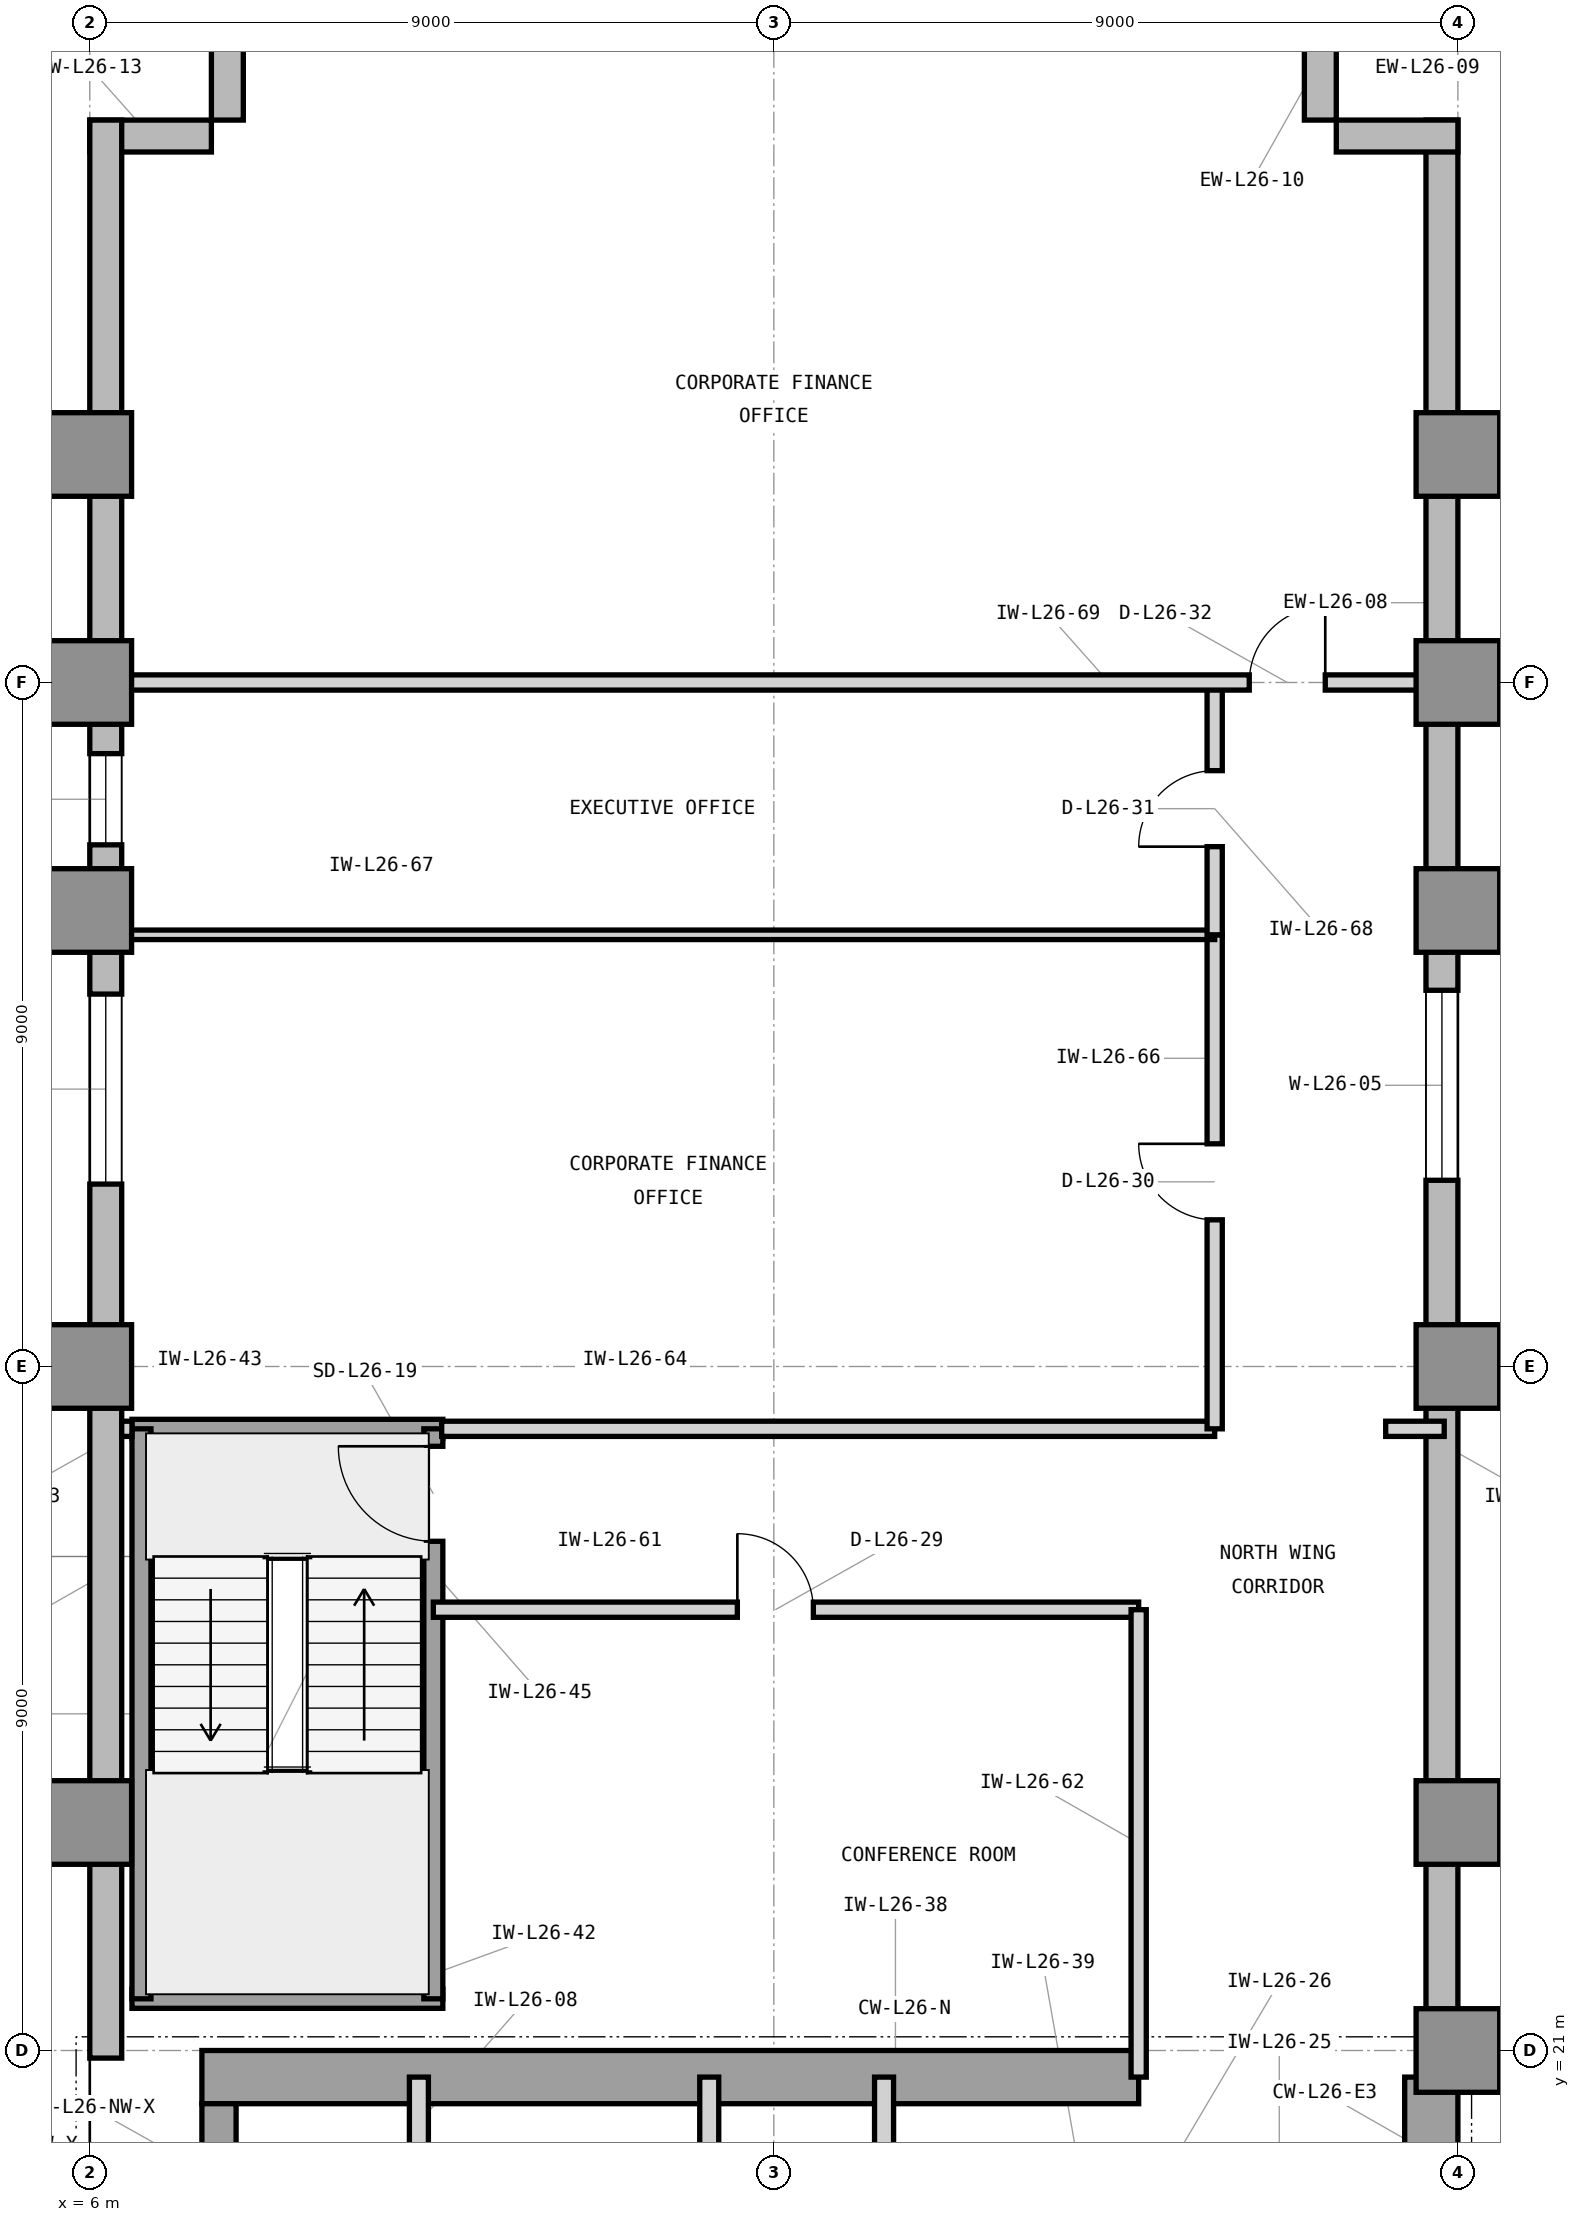
"""IFC4 building model, lengths in metres.
Left out: names, types, materials, properties, quantities, classifications, styles, units other than length and angle.
Written with IfcOpenShell. Run it as: python <this file> out.ifc"""

import sys

from ifc_helpers import new_model, si_unit, direction, frame, frame_2d, origin, origin_2d, place, context, subcontext, project, spatial, rectangle, extrude, element, fill, save


model = new_model("IFC4")
c1 = context("Model", 3, precision=1e-05, world=origin(), true_north=direction((0.0, 1.0)))
c2 = subcontext(c1, "Body", "Model", "MODEL_VIEW")
j1 = project(units=[si_unit("LENGTHUNIT", "METRE"), si_unit("PLANEANGLEUNIT", "RADIAN")], contexts=[c1])
p1 = place(None, origin())
s1 = spatial("IfcSite", under=j1, at=p1, CompositionType="ELEMENT")
p2 = place(p1, origin())
s2 = spatial("IfcBuilding", under=s1, at=p2, CompositionType="ELEMENT")
p3 = place(p2, frame((0.0, 0.0, 112.8)))
s3 = spatial("IfcBuildingStorey", under=s2, at=p3, CompositionType="ELEMENT", Elevation=112.8)
p4 = place(p3, frame((7.475, 20.65, 0.0), z_axis=(0.0, 0.0, 1.0), x_axis=(1.0, 0.0, 0.0)))
e1 = element("IfcWall", 1, at=p4, inside=s3, PredefinedType="SHEAR", context=c2, shape_type="SweptSolid", body=[
    extrude(rectangle(XDim=12.325, YDim=0.7, at=frame_2d((6.163, 0.0))), origin(), (0.0, 0.0, 1.0), 3.9),
])
p5 = place(p3, frame((23.65, 16.6, 0.0), z_axis=(0.0, 0.0, 1.0), x_axis=(0.0, 1.0, 0.0)))
e2 = element("IfcWall", 2, at=p5, inside=s3, PredefinedType="SHEAR", context=c2, shape_type="SweptSolid", body=[
    extrude(rectangle(XDim=4.05, YDim=0.7, at=frame_2d((2.025, 0.0))), origin(), (0.0, 0.0, 1.0), 3.9),
])
p6 = place(p3, frame((7.7, 19.575, 0.0), z_axis=(0.0, 0.0, 1.0), x_axis=(0.0, 1.0, 0.0)))
e3 = element("IfcWall", 3, at=p6, inside=s3, PredefinedType="SHEAR", context=c2, shape_type="SweptSolid", body=[
    extrude(rectangle(XDim=0.725, YDim=0.45, at=frame_2d((0.363, 0.0))), origin(), (0.0, 0.0, 1.0), 3.9),
])
for number, where, z_axis, x_axis in (
    (4, (24.0, 21.0, 0.0), (0.0, 0.0, 1.0), (1.0, 0.0, 0.0)),
    (5, (6.0, 24.0, 0.0), (0.0, 0.0, 1.0), (1.0, 0.0, 0.0)),
    (6, (24.0, 24.0, 0.0), (0.0, 0.0, 1.0), (1.0, 0.0, 0.0)),
    (7, (6.0, 30.0, 0.0), (0.0, 0.0, 1.0), (1.0, 0.0, 0.0)),
    (8, (24.0, 30.0, 0.0), (0.0, 0.0, 1.0), (1.0, 0.0, 0.0)),
    (9, (6.0, 36.0, 0.0), (0.0, 0.0, 1.0), (1.0, 0.0, 0.0)),
    (10, (24.0, 36.0, 0.0), (0.0, 0.0, 1.0), (1.0, 0.0, 0.0)),
    (11, (6.0, 39.0, 0.0), (0.0, 0.0, 1.0), (1.0, 0.0, 0.0)),
    (12, (24.0, 39.0, 0.0), (0.0, 0.0, 1.0), (1.0, 0.0, 0.0)),
    (13, (6.0, 42.0, 0.0), (0.0, 0.0, 1.0), (1.0, 0.0, 0.0)),
    (14, (24.0, 42.0, 0.0), (0.0, 0.0, 1.0), (1.0, 0.0, 0.0)),
):
    element("IfcColumn", number, at=place(p3, frame(where, z_axis=z_axis, x_axis=x_axis)), inside=s3, PredefinedType="COLUMN", context=c2, shape_type="SweptSolid", body=[
        extrude(rectangle(XDim=1.1, YDim=1.1, at=origin_2d()), origin(), (0.0, 0.0, 1.0), 3.9),
    ])
p7 = place(p3, frame((61.4, 20.79, 0.0), z_axis=(0.0, 0.0, 1.0), x_axis=(-1.0, 0.0, 0.0)))
e15 = element("IfcWall", 15, at=p7, inside=s3, PredefinedType="STANDARD", context=c2, shape_type="SweptSolid", body=[
    extrude(rectangle(XDim=37.4, YDim=0.42, at=frame_2d((18.7, 0.0))), origin(), (0.0, 0.0, 1.0), 3.7),
])
p8 = place(p7, frame((35.222, 0.0, 0.85)))
e16 = element("IfcOpeningElement", 16, at=p8, cuts=e15, PredefinedType="OPENING", context=c2, shape_type="SweptSolid", body=[
    extrude(rectangle(XDim=1.2, YDim=2.25, at=frame_2d((0.6, 1.125))), frame((0.0, 0.22, 0.0), z_axis=(0.0, -1.0, 0.0), x_axis=(1.0, 0.0, 0.0)), (0.0, 0.0, 1.0), 0.44),
])
p9 = place(p7, frame((29.386, 0.0, 0.85)))
e17 = element("IfcOpeningElement", 17, at=p9, cuts=e15, PredefinedType="OPENING", context=c2, shape_type="SweptSolid", body=[
    extrude(rectangle(XDim=2.5, YDim=2.25, at=frame_2d((1.25, 1.125))), frame((0.0, 0.22, 0.0), z_axis=(0.0, -1.0, 0.0), x_axis=(1.0, 0.0, 0.0)), (0.0, 0.0, 1.0), 0.44),
])
p10 = place(p7, frame((20.386, 0.0, 0.85)))
e18 = element("IfcOpeningElement", 18, at=p10, cuts=e15, PredefinedType="OPENING", context=c2, shape_type="SweptSolid", body=[
    extrude(rectangle(XDim=2.5, YDim=2.25, at=frame_2d((1.25, 1.125))), frame((0.0, 0.22, 0.0), z_axis=(0.0, -1.0, 0.0), x_axis=(1.0, 0.0, 0.0)), (0.0, 0.0, 1.0), 0.44),
])
p11 = place(p7, frame((8.336, 0.0, 0.85)))
e19 = element("IfcOpeningElement", 19, at=p11, cuts=e15, PredefinedType="OPENING", context=c2, shape_type="SweptSolid", body=[
    extrude(rectangle(XDim=1.2, YDim=2.25, at=frame_2d((0.6, 1.125))), frame((0.0, 0.22, 0.0), z_axis=(0.0, -1.0, 0.0), x_axis=(1.0, 0.0, 0.0)), (0.0, 0.0, 1.0), 0.44),
])
p12 = place(p3, frame((23.79, 21.0, 0.0), z_axis=(0.0, 0.0, 1.0), x_axis=(0.0, 1.0, 0.0)))
e20 = element("IfcWall", 20, at=p12, inside=s3, PredefinedType="STANDARD", context=c2, shape_type="SweptSolid", body=[
    extrude(rectangle(XDim=25.4, YDim=0.42, at=frame_2d((12.7, 0.0))), origin(), (0.0, 0.0, 1.0), 3.7),
])
p13 = place(p12, frame((11.45, 0.0, 0.85)))
e21 = element("IfcOpeningElement", 21, at=p13, cuts=e20, PredefinedType="OPENING", context=c2, shape_type="SweptSolid", body=[
    extrude(rectangle(XDim=2.5, YDim=2.25, at=frame_2d((1.25, 1.125))), frame((0.0, 0.22, 0.0), z_axis=(0.0, -1.0, 0.0), x_axis=(1.0, 0.0, 0.0)), (0.0, 0.0, 1.0), 0.44),
])
for number, where, z_axis, x_axis in (
    (22, (24.0, 46.19, 0.0), (0.0, 0.0, 1.0), (-1.0, 0.0, 0.0)),
    (23, (22.19, 46.4, 0.0), (0.0, 0.0, 1.0), (0.0, 1.0, 0.0)),
    (24, (7.81, 48.0, 0.0), (0.0, 0.0, 1.0), (0.0, -1.0, 0.0)),
    (25, (7.6, 46.19, 0.0), (0.0, 0.0, 1.0), (-1.0, 0.0, 0.0)),
):
    element("IfcWall", number, at=place(p3, frame(where, z_axis=z_axis, x_axis=x_axis)), inside=s3, PredefinedType="STANDARD", context=c2, shape_type="SweptSolid", body=[
        extrude(rectangle(XDim=1.6, YDim=0.42, at=frame_2d((0.8, 0.0))), origin(), (0.0, 0.0, 1.0), 3.7),
    ])
p14 = place(p3, frame((6.21, 46.4, 0.0), z_axis=(0.0, 0.0, 1.0), x_axis=(0.0, -1.0, 0.0)))
e26 = element("IfcWall", 26, at=p14, inside=s3, PredefinedType="STANDARD", context=c2, shape_type="SweptSolid", body=[
    extrude(rectangle(XDim=25.5, YDim=0.42, at=frame_2d((12.75, 0.0))), origin(), (0.0, 0.0, 1.0), 3.7),
])
p15 = place(p14, frame((11.5, 0.0, 0.85)))
e27 = element("IfcOpeningElement", 27, at=p15, cuts=e26, PredefinedType="OPENING", context=c2, shape_type="SweptSolid", body=[
    extrude(rectangle(XDim=2.5, YDim=2.25, at=frame_2d((1.25, 1.125))), frame((0.0, 0.22, 0.0), z_axis=(0.0, -1.0, 0.0), x_axis=(1.0, 0.0, 0.0)), (0.0, 0.0, 1.0), 0.44),
])
p16 = place(p14, frame((8.336, 0.0, 0.85)))
e28 = element("IfcOpeningElement", 28, at=p16, cuts=e26, PredefinedType="OPENING", context=c2, shape_type="SweptSolid", body=[
    extrude(rectangle(XDim=1.2, YDim=2.25, at=frame_2d((0.6, 1.125))), frame((0.0, 0.22, 0.0), z_axis=(0.0, -1.0, 0.0), x_axis=(1.0, 0.0, 0.0)), (0.0, 0.0, 1.0), 0.44),
])
p17 = place(p3, frame((10.33, 19.45, 0.0), z_axis=(0.0, 0.0, 1.0), x_axis=(0.0, 1.0, 0.0)))
e29 = element("IfcWall", 29, at=p17, inside=s3, PredefinedType="PARTITIONING", context=c2, shape_type="SweptSolid", body=[
    extrude(rectangle(XDim=1.2, YDim=0.25, at=frame_2d((0.6, 0.0))), origin(), (0.0, 0.0, 1.0), 2.917),
])
for number, where, z_axis, x_axis in (
    (30, (14.15, 16.7, 0.0), (0.0, 0.0, 1.0), (0.0, 1.0, 0.0)),
    (31, (16.45, 16.7, 0.0), (0.0, 0.0, 1.0), (0.0, 1.0, 0.0)),
):
    element("IfcWall", number, at=place(p3, frame(where, z_axis=z_axis, x_axis=x_axis)), inside=s3, PredefinedType="PARTITIONING", context=c2, shape_type="SweptSolid", body=[
        extrude(rectangle(XDim=3.95, YDim=0.25, at=frame_2d((1.975, 0.0))), origin(), (0.0, 0.0, 1.0), 3.69),
    ])
for number, where, z_axis, x_axis in (
    (32, (6.555, 21.68, 0.0), (0.0, 0.0, 1.0), (1.0, 0.0, 0.0)),
    (33, (6.555, 29.18, 0.0), (0.0, 0.0, 1.0), (1.0, 0.0, 0.0)),
):
    element("IfcWall", number, at=place(p3, frame(where, z_axis=z_axis, x_axis=x_axis)), inside=s3, PredefinedType="SHEAR", context=c2, shape_type="SweptSolid", body=[
        extrude(rectangle(XDim=4.09, YDim=0.25, at=frame_2d((2.045, 0.0))), origin(), (0.0, 0.0, 1.0), 3.9),
    ])
p18 = place(p3, frame((6.68, 21.68, 0.0), z_axis=(0.0, 0.0, 1.0), x_axis=(0.0, 1.0, 0.0)))
e34 = element("IfcWall", 34, at=p18, inside=s3, PredefinedType="SHEAR", context=c2, shape_type="SweptSolid", body=[
    extrude(rectangle(XDim=7.5, YDim=0.25, at=frame_2d((3.75, 0.0))), origin(), (0.0, 0.0, 1.0), 3.9),
])
p19 = place(p3, frame((10.52, 21.68, 0.0), z_axis=(0.0, 0.0, 1.0), x_axis=(0.0, 1.0, 0.0)))
e35 = element("IfcWall", 35, at=p19, inside=s3, PredefinedType="SHEAR", context=c2, shape_type="SweptSolid", body=[
    extrude(rectangle(XDim=7.5, YDim=0.25, at=frame_2d((3.75, 0.0))), origin(), (0.0, 0.0, 1.0), 3.9),
])
p20 = place(p19, frame((6.02, 0.0, 0.0)))
e36 = element("IfcOpeningElement", 36, at=p20, cuts=e35, PredefinedType="OPENING", context=c2, shape_type="SweptSolid", body=[
    extrude(rectangle(XDim=1.25, YDim=2.2, at=frame_2d((0.625, 1.1))), frame((0.0, 0.135, 0.0), z_axis=(0.0, -1.0, 0.0), x_axis=(1.0, 0.0, 0.0)), (0.0, 0.0, 1.0), 0.27),
])
p21 = place(p3, frame((10.52, 26.8, 0.0), z_axis=(0.0, 0.0, 1.0), x_axis=(1.0, 0.0, 0.0)))
e37 = element("IfcWall", 37, at=p21, inside=s3, PredefinedType="PARTITIONING", context=c2, shape_type="SweptSolid", body=[
    extrude(rectangle(XDim=9.28, YDim=0.2, at=frame_2d((4.64, 0.0))), origin(), (0.0, 0.0, 1.0), 3.69),
])
p22 = place(p21, frame((4.0, 0.0, 0.0)))
e38 = element("IfcOpeningElement", 38, at=p22, cuts=e37, PredefinedType="OPENING", context=c2, shape_type="SweptSolid", body=[
    extrude(rectangle(XDim=1.0, YDim=2.15, at=frame_2d((0.5, 1.075))), frame((0.0, 0.11, 0.0), z_axis=(0.0, -1.0, 0.0), x_axis=(1.0, 0.0, 0.0)), (0.0, 0.0, 1.0), 0.22),
])
p23 = place(p3, frame((19.8, 20.65, 0.0), z_axis=(0.0, 0.0, 1.0), x_axis=(0.0, 1.0, 0.0)))
e39 = element("IfcWall", 39, at=p23, inside=s3, PredefinedType="PARTITIONING", context=c2, shape_type="SweptSolid", body=[
    extrude(rectangle(XDim=6.15, YDim=0.2, at=frame_2d((3.075, 0.0))), origin(), (0.0, 0.0, 1.0), 3.69),
])
p24 = place(p3, frame((6.42, 29.18, 0.0), z_axis=(0.0, 0.0, 1.0), x_axis=(1.0, 0.0, 0.0)))
e40 = element("IfcWall", 40, at=p24, inside=s3, PredefinedType="PARTITIONING", context=c2, shape_type="SweptSolid", body=[
    extrude(rectangle(XDim=0.135, YDim=0.2, at=frame_2d((0.067, 0.0))), origin(), (0.0, 0.0, 1.0), 3.69),
])
p25 = place(p3, frame((10.63, 29.18, 0.0), z_axis=(0.0, 0.0, 1.0), x_axis=(1.0, 0.0, 0.0)))
e41 = element("IfcWall", 41, at=p25, inside=s3, PredefinedType="PARTITIONING", context=c2, shape_type="SweptSolid", body=[
    extrude(rectangle(XDim=10.17, YDim=0.2, at=frame_2d((5.085, 0.0))), origin(), (0.0, 0.0, 1.0), 3.69),
])
p26 = place(p3, frame((23.05, 29.18, 0.0), z_axis=(0.0, 0.0, 1.0), x_axis=(1.0, 0.0, 0.0)))
e42 = element("IfcWall", 42, at=p26, inside=s3, PredefinedType="PARTITIONING", context=c2, shape_type="SweptSolid", body=[
    extrude(rectangle(XDim=0.77, YDim=0.2, at=frame_2d((0.385, 0.0))), origin(), (0.0, 0.0, 1.0), 3.69),
])
p27 = place(p3, frame((20.8, 29.18, 0.0), z_axis=(0.0, 0.0, 1.0), x_axis=(0.0, 1.0, 0.0)))
e43 = element("IfcWall", 43, at=p27, inside=s3, PredefinedType="PARTITIONING", context=c2, shape_type="SweptSolid", body=[
    extrude(rectangle(XDim=6.5, YDim=0.2, at=frame_2d((3.25, 0.0))), origin(), (0.0, 0.0, 1.0), 3.69),
])
p28 = place(p27, frame((2.75, 0.0, 0.0)))
e44 = element("IfcOpeningElement", 44, at=p28, cuts=e43, PredefinedType="OPENING", context=c2, shape_type="SweptSolid", body=[
    extrude(rectangle(XDim=1.0, YDim=2.15, at=frame_2d((0.5, 1.075))), frame((0.0, 0.11, 0.0), z_axis=(0.0, -1.0, 0.0), x_axis=(1.0, 0.0, 0.0)), (0.0, 0.0, 1.0), 0.22),
])
p29 = place(p3, frame((6.18, 35.68, 0.0), z_axis=(0.0, 0.0, 1.0), x_axis=(1.0, 0.0, 0.0)))
e45 = element("IfcWall", 45, at=p29, inside=s3, PredefinedType="PARTITIONING", context=c2, shape_type="SweptSolid", body=[
    extrude(rectangle(XDim=14.62, YDim=0.125, at=frame_2d((7.31, 0.0))), origin(), (0.0, 0.0, 1.0), 3.69),
])
p30 = place(p3, frame((20.8, 35.68, 0.0), z_axis=(0.0, 0.0, 1.0), x_axis=(0.0, 1.0, 0.0)))
e46 = element("IfcWall", 46, at=p30, inside=s3, PredefinedType="PARTITIONING", context=c2, shape_type="SweptSolid", body=[
    extrude(rectangle(XDim=3.32, YDim=0.2, at=frame_2d((1.66, 0.0))), origin(), (0.0, 0.0, 1.0), 3.69),
])
p31 = place(p30, frame((1.16, 0.0, 0.0)))
e47 = element("IfcOpeningElement", 47, at=p31, cuts=e46, PredefinedType="OPENING", context=c2, shape_type="SweptSolid", body=[
    extrude(rectangle(XDim=1.0, YDim=2.15, at=frame_2d((0.5, 1.075))), frame((0.0, 0.11, 0.0), z_axis=(0.0, -1.0, 0.0), x_axis=(1.0, 0.0, 0.0)), (0.0, 0.0, 1.0), 0.22),
])
p32 = place(p3, frame((6.18, 39.0, 0.0), z_axis=(0.0, 0.0, 1.0), x_axis=(1.0, 0.0, 0.0)))
e48 = element("IfcWall", 48, at=p32, inside=s3, PredefinedType="PARTITIONING", context=c2, shape_type="SweptSolid", body=[
    extrude(rectangle(XDim=17.64, YDim=0.2, at=frame_2d((8.82, 0.0))), origin(), (0.0, 0.0, 1.0), 2.917),
])
p33 = place(p32, frame((15.075, 0.0, 0.0)))
e49 = element("IfcOpeningElement", 49, at=p33, cuts=e48, PredefinedType="OPENING", context=c2, shape_type="SweptSolid", body=[
    extrude(rectangle(XDim=1.0, YDim=2.15, at=frame_2d((0.5, 1.075))), frame((0.0, 0.11, 0.0), z_axis=(0.0, -1.0, 0.0), x_axis=(1.0, 0.0, 0.0)), (0.0, 0.0, 1.0), 0.22),
])
p34 = place(p13, origin())
e50 = element("IfcWindow", 50, at=p34, inside=s3, PartitioningType="SINGLE_PANEL", PredefinedType="WINDOW", context=c2, shape_type="SweptSolid", body=[
    extrude(rectangle(XDim=2.5, YDim=2.25, at=frame_2d((1.25, 1.125))), frame((0.0, 0.11, 0.0), z_axis=(0.0, -1.0, 0.0), x_axis=(1.0, 0.0, 0.0)), (0.0, 0.0, 1.0), 0.06),
])
fill(e21, e50)
p35 = place(p15, origin())
e51 = element("IfcWindow", 51, at=p35, inside=s3, PartitioningType="SINGLE_PANEL", PredefinedType="WINDOW", context=c2, shape_type="SweptSolid", body=[
    extrude(rectangle(XDim=2.5, YDim=2.25, at=frame_2d((1.25, 1.125))), frame((0.0, 0.11, 0.0), z_axis=(0.0, -1.0, 0.0), x_axis=(1.0, 0.0, 0.0)), (0.0, 0.0, 1.0), 0.06),
])
fill(e27, e51)
p36 = place(p20, origin())
e52 = element("IfcDoor", 52, at=p36, inside=s3, OperationType="SINGLE_SWING_RIGHT", PredefinedType="DOOR", context=c2, shape_type="SweptSolid", body=[
    extrude(rectangle(XDim=1.25, YDim=2.2, at=frame_2d((0.625, 1.1))), frame((0.0, 0.025, 0.0), z_axis=(0.0, -1.0, 0.0), x_axis=(1.0, 0.0, 0.0)), (0.0, 0.0, 1.0), 0.05),
])
fill(e36, e52)
p37 = place(p22, origin())
e53 = element("IfcDoor", 53, at=p37, inside=s3, OperationType="SINGLE_SWING_LEFT", PredefinedType="DOOR", context=c2, shape_type="SweptSolid", body=[
    extrude(rectangle(XDim=1.0, YDim=2.15, at=frame_2d((0.5, 1.075))), frame((0.0, 0.025, 0.0), z_axis=(0.0, -1.0, 0.0), x_axis=(1.0, 0.0, 0.0)), (0.0, 0.0, 1.0), 0.05),
])
fill(e38, e53)
p38 = place(p28, origin())
e54 = element("IfcDoor", 54, at=p38, inside=s3, OperationType="SINGLE_SWING_RIGHT", PredefinedType="DOOR", context=c2, shape_type="SweptSolid", body=[
    extrude(rectangle(XDim=1.0, YDim=2.15, at=frame_2d((0.5, 1.075))), frame((0.0, 0.025, 0.0), z_axis=(0.0, -1.0, 0.0), x_axis=(1.0, 0.0, 0.0)), (0.0, 0.0, 1.0), 0.05),
])
fill(e44, e54)
p39 = place(p31, origin())
e55 = element("IfcDoor", 55, at=p39, inside=s3, OperationType="SINGLE_SWING_LEFT", PredefinedType="DOOR", context=c2, shape_type="SweptSolid", body=[
    extrude(rectangle(XDim=1.0, YDim=2.15, at=frame_2d((0.5, 1.075))), frame((0.0, 0.025, 0.0), z_axis=(0.0, -1.0, 0.0), x_axis=(1.0, 0.0, 0.0)), (0.0, 0.0, 1.0), 0.05),
])
fill(e47, e55)
p40 = place(p33, origin())
e56 = element("IfcDoor", 56, at=p40, inside=s3, OperationType="SINGLE_SWING_RIGHT", PredefinedType="DOOR", context=c2, shape_type="SweptSolid", body=[
    extrude(rectangle(XDim=1.0, YDim=2.15, at=frame_2d((0.5, 1.075))), frame((0.0, 0.025, 0.0), z_axis=(0.0, -1.0, 0.0), x_axis=(1.0, 0.0, 0.0)), (0.0, 0.0, 1.0), 0.05),
])
fill(e49, e56)
p41 = place(p16, origin())
e57 = element("IfcWindow", 57, at=p41, inside=s3, PartitioningType="SINGLE_PANEL", PredefinedType="WINDOW", context=c2, shape_type="SweptSolid", body=[
    extrude(rectangle(XDim=1.2, YDim=2.25, at=frame_2d((0.6, 1.125))), frame((0.0, 0.11, 0.0), z_axis=(0.0, -1.0, 0.0), x_axis=(1.0, 0.0, 0.0)), (0.0, 0.0, 1.0), 0.06),
])
fill(e28, e57)
save(model, sys.argv[1])
